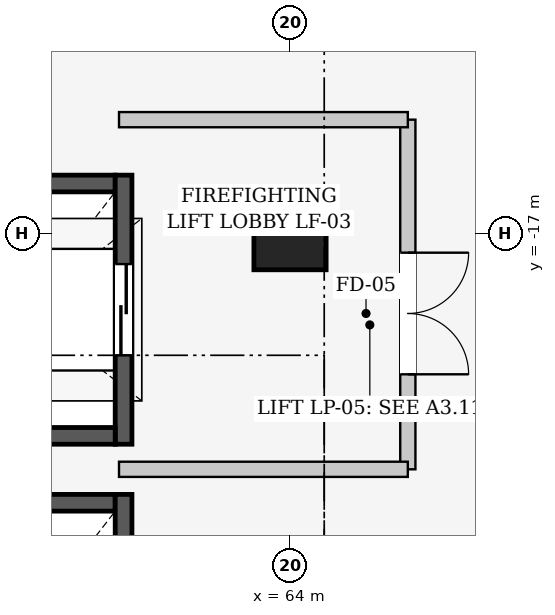
"""IFC4 building model, lengths in metres.
Left out: names, types, materials, properties, quantities, classifications, styles, units other than length and angle.
Written with IfcOpenShell. Run it as: python <this file> out.ifc"""

import sys

from ifc_helpers import new_model, si_unit, direction, frame, frame_2d, origin, origin_2d, place, context, subcontext, project, spatial, rectangle, extrude, element, fill, save


model = new_model("IFC4")
c1 = context("Model", 3, precision=1e-05, world=origin(), true_north=direction((0.0, 1.0)))
c2 = subcontext(c1, "Body", "Model", "MODEL_VIEW")
j1 = project(units=[si_unit("LENGTHUNIT", "METRE"), si_unit("PLANEANGLEUNIT", "RADIAN")], contexts=[c1])
p1 = place(None, origin())
s1 = spatial("IfcSite", under=j1, at=p1, CompositionType="ELEMENT")
p2 = place(p1, origin())
s2 = spatial("IfcBuilding", under=s1, at=p2, CompositionType="ELEMENT")
p3 = place(p2, frame((0.0, 0.0, 6.0)))
s3 = spatial("IfcBuildingStorey", under=s2, at=p3, CompositionType="ELEMENT", Elevation=6.0)
p4 = place(p3, frame((64.0, -17.0, 0.0), z_axis=(0.0, 0.0, 1.0), x_axis=(1.0, 0.0, 0.0)))
e1 = element("IfcColumn", 1, at=p4, inside=s3, PredefinedType="COLUMN", context=c2, shape_type="SweptSolid", body=[
    extrude(rectangle(XDim=0.95, YDim=0.95, at=origin_2d()), origin(), (0.0, 0.0, 1.0), 5.4),
])
p5 = place(p3, frame((59.3, -16.34, 0.0), z_axis=(0.0, 0.0, 1.0), x_axis=(1.0, 0.0, 0.0)))
e2 = element("IfcWall", 2, at=p5, inside=s3, PredefinedType="SHEAR", context=c2, shape_type="SweptSolid", body=[
    extrude(rectangle(XDim=2.4, YDim=0.22, at=frame_2d((1.2, 0.0))), origin(), (0.0, 0.0, 1.0), 5.4),
])
p6 = place(p3, frame((61.81, -16.23, 0.0), z_axis=(0.0, 0.0, 1.0), x_axis=(0.0, -1.0, 0.0)))
e3 = element("IfcWall", 3, at=p6, inside=s3, PredefinedType="SHEAR", context=c2, shape_type="SweptSolid", body=[
    extrude(rectangle(XDim=3.54, YDim=0.22, at=frame_2d((1.77, 0.0))), origin(), (0.0, 0.0, 1.0), 5.4),
])
p7 = place(p6, frame((1.17, 0.0, 0.0)))
e4 = element("IfcOpeningElement", 4, at=p7, cuts=e3, PredefinedType="OPENING", context=c2, shape_type="SweptSolid", body=[
    extrude(rectangle(XDim=1.2, YDim=2.2, at=frame_2d((0.6, 1.1))), frame((0.0, 0.12, 0.0), z_axis=(0.0, -1.0, 0.0), x_axis=(1.0, 0.0, 0.0)), (0.0, 0.0, 1.0), 0.24),
])
for number, where, z_axis, x_axis in (
    (5, (61.7, -19.66, 0.0), (0.0, 0.0, 1.0), (-1.0, 0.0, 0.0)),
    (6, (59.3, -20.54, 0.0), (0.0, 0.0, 1.0), (1.0, 0.0, 0.0)),
):
    element("IfcWall", number, at=place(p3, frame(where, z_axis=z_axis, x_axis=x_axis)), inside=s3, PredefinedType="SHEAR", context=c2, shape_type="SweptSolid", body=[
        extrude(rectangle(XDim=2.4, YDim=0.22, at=frame_2d((1.2, 0.0))), origin(), (0.0, 0.0, 1.0), 5.4),
    ])
p8 = place(p3, frame((61.81, -20.43, 0.0), z_axis=(0.0, 0.0, 1.0), x_axis=(0.0, -1.0, 0.0)))
e7 = element("IfcWall", 7, at=p8, inside=s3, PredefinedType="SHEAR", context=c2, shape_type="SweptSolid", body=[
    extrude(rectangle(XDim=3.54, YDim=0.22, at=frame_2d((1.77, 0.0))), origin(), (0.0, 0.0, 1.0), 5.4),
])
p9 = place(p8, frame((1.22, 0.0, 0.0)))
e8 = element("IfcOpeningElement", 8, at=p9, cuts=e7, PredefinedType="OPENING", context=c2, shape_type="SweptSolid", body=[
    extrude(rectangle(XDim=1.1, YDim=2.2, at=frame_2d((0.55, 1.1))), frame((0.0, 0.12, 0.0), z_axis=(0.0, -1.0, 0.0), x_axis=(1.0, 0.0, 0.0)), (0.0, 0.0, 1.0), 0.24),
])
p10 = place(p3, frame((65.55, -15.5, 0.0), z_axis=(0.0, 0.0, 1.0), x_axis=(0.0, -1.0, 0.0)))
e9 = element("IfcWall", 9, at=p10, inside=s3, PredefinedType="PARTITIONING", context=c2, shape_type="SweptSolid", body=[
    extrude(rectangle(XDim=4.6, YDim=0.2, at=frame_2d((2.3, 0.0))), origin(), (0.0, 0.0, 1.0), 4.145),
])
p11 = place(p10, frame((1.75, 0.0, 0.0)))
e10 = element("IfcOpeningElement", 10, at=p11, cuts=e9, PredefinedType="OPENING", context=c2, shape_type="SweptSolid", body=[
    extrude(rectangle(XDim=1.6, YDim=2.2, at=frame_2d((0.8, 1.1))), frame((0.0, 0.11, 0.0), z_axis=(0.0, -1.0, 0.0), x_axis=(1.0, 0.0, 0.0)), (0.0, 0.0, 1.0), 0.22),
])
for number, where, z_axis, x_axis in (
    (11, (61.75, -15.5, 0.0), (0.0, 0.0, 1.0), (1.0, 0.0, 0.0)),
    (12, (65.55, -20.1, 0.0), (0.0, 0.0, 1.0), (-1.0, 0.0, 0.0)),
):
    element("IfcWall", number, at=place(p3, frame(where, z_axis=z_axis, x_axis=x_axis)), inside=s3, PredefinedType="PARTITIONING", context=c2, shape_type="SweptSolid", body=[
        extrude(rectangle(XDim=3.8, YDim=0.2, at=frame_2d((1.9, 0.0))), origin(), (0.0, 0.0, 1.0), 4.445),
    ])
p12 = place(p7, origin())
e13 = element("IfcDoor", 13, at=p12, inside=s3, OperationType="SLIDING_TO_LEFT", PredefinedType="DOOR", context=c2, shape_type="SweptSolid", body=[
    extrude(rectangle(XDim=1.2, YDim=2.2, at=frame_2d((0.6, 1.1))), frame((0.0, 0.025, 0.0), z_axis=(0.0, -1.0, 0.0), x_axis=(1.0, 0.0, 0.0)), (0.0, 0.0, 1.0), 0.05),
])
fill(e4, e13)
p13 = place(p11, origin())
e14 = element("IfcDoor", 14, at=p13, inside=s3, OperationType="DOUBLE_DOOR_SINGLE_SWING", PredefinedType="DOOR", context=c2, shape_type="SweptSolid", body=[
    extrude(rectangle(XDim=1.6, YDim=2.2, at=frame_2d((0.8, 1.1))), frame((0.0, 0.025, 0.0), z_axis=(0.0, -1.0, 0.0), x_axis=(1.0, 0.0, 0.0)), (0.0, 0.0, 1.0), 0.05),
])
fill(e10, e14)
save(model, sys.argv[1])
